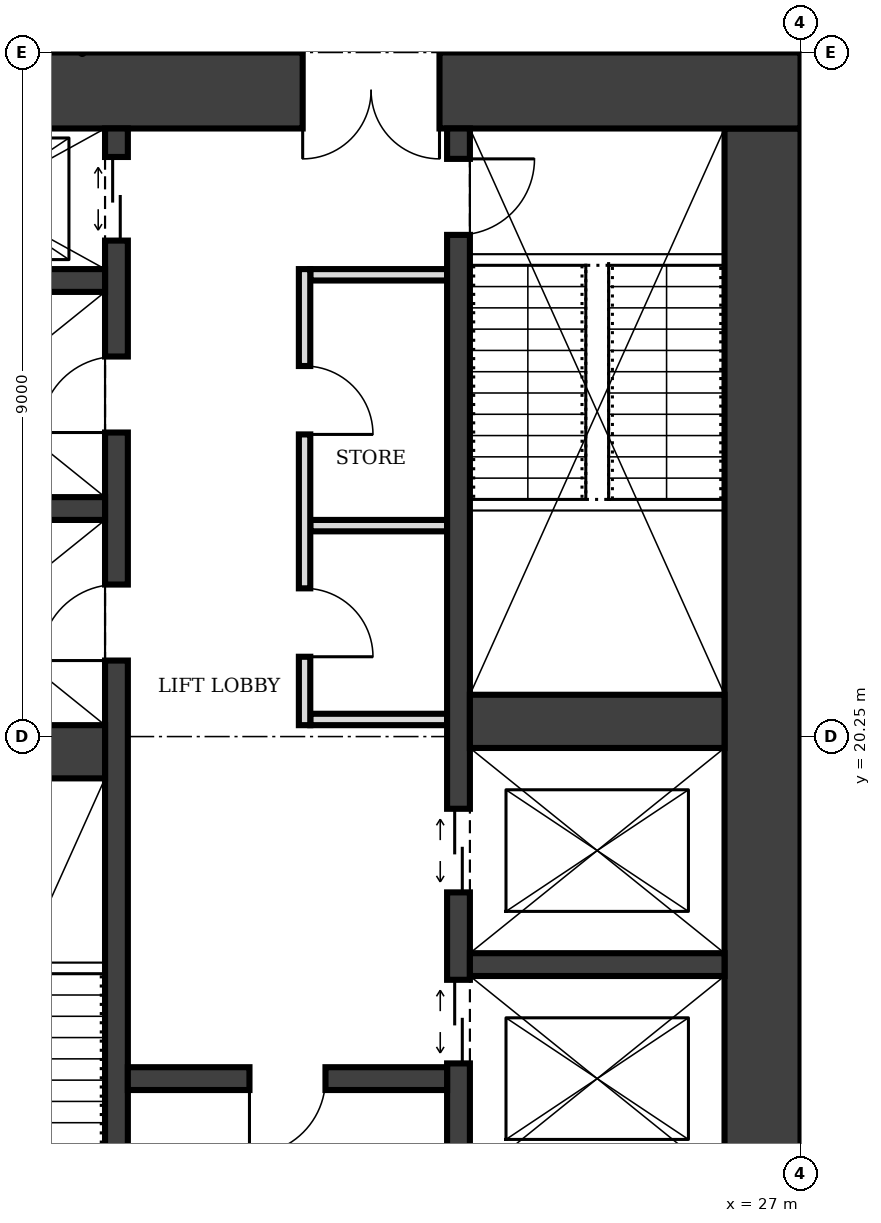
"""IFC4 building model, lengths in metres.
Left out: names, types, materials, properties, quantities, classifications, styles, units other than length and angle.
Written with IfcOpenShell. Run it as: python <this file> out.ifc"""

import sys

from ifc_helpers import new_model, si_unit, direction, frame, frame_2d, origin, place, context, subcontext, project, spatial, rectangle, extrude, element, fill, save


model = new_model("IFC4")
c1 = context("Model", 3, precision=1e-05, world=origin(), true_north=direction((0.0, 1.0)))
c2 = subcontext(c1, "Body", "Model", "MODEL_VIEW")
j1 = project(units=[si_unit("LENGTHUNIT", "METRE"), si_unit("PLANEANGLEUNIT", "RADIAN")], contexts=[c1])
p1 = place(None, origin())
s1 = spatial("IfcSite", under=j1, at=p1, CompositionType="ELEMENT")
p2 = place(p1, origin())
s2 = spatial("IfcBuilding", under=s1, at=p2, CompositionType="ELEMENT")
p3 = place(p2, frame((0.0, 0.0, 269.0)))
s3 = spatial("IfcBuildingStorey", under=s2, at=p3, CompositionType="ELEMENT", Elevation=269.0)
p4 = place(p3, frame((26.5, 12.25, 0.0), z_axis=(0.0, 0.0, 1.0), x_axis=(0.0, 1.0, 0.0)))
e1 = element("IfcWall", 1, at=p4, inside=s3, PredefinedType="SHEAR", context=c2, shape_type="SweptSolid", body=[
    extrude(rectangle(XDim=16.0, YDim=1.0, at=frame_2d((8.0, 0.0))), origin(), (0.0, 0.0, 1.0), 4.0),
])
p5 = place(p3, frame((27.0, 28.75, 0.0), z_axis=(0.0, 0.0, 1.0), x_axis=(-1.0, 0.0, 0.0)))
e2 = element("IfcWall", 2, at=p5, inside=s3, PredefinedType="SHEAR", context=c2, shape_type="SweptSolid", body=[
    extrude(rectangle(XDim=13.5, YDim=1.0, at=frame_2d((6.75, 0.0))), origin(), (0.0, 0.0, 1.0), 4.0),
])
p6 = place(p5, frame((4.75, 0.0, 0.0)))
e3 = element("IfcOpeningElement", 3, at=p6, cuts=e2, PredefinedType="OPENING", context=c2, shape_type="SweptSolid", body=[
    extrude(rectangle(XDim=1.8, YDim=2.1, at=frame_2d((0.9, 1.05))), frame((0.0, 0.51, 0.0), z_axis=(0.0, -1.0, 0.0), x_axis=(1.0, 0.0, 0.0)), (0.0, 0.0, 1.0), 1.02),
])
p7 = place(p3, frame((18.0, 12.25, 0.0), z_axis=(0.0, 0.0, 1.0), x_axis=(0.0, 1.0, 0.0)))
e4 = element("IfcWall", 4, at=p7, inside=s3, PredefinedType="SHEAR", context=c2, shape_type="SweptSolid", body=[
    extrude(rectangle(XDim=16.0, YDim=0.3, at=frame_2d((8.0, 0.0))), origin(), (0.0, 0.0, 1.0), 4.0),
])
p8 = place(p7, frame((0.4, 0.0, 0.0)))
e5 = element("IfcOpeningElement", 5, at=p8, cuts=e4, PredefinedType="OPENING", context=c2, shape_type="SweptSolid", body=[
    extrude(rectangle(XDim=1.0, YDim=2.1, at=frame_2d((0.5, 1.05))), frame((0.0, 0.16, 0.0), z_axis=(0.0, -1.0, 0.0), x_axis=(1.0, 0.0, 0.0)), (0.0, 0.0, 1.0), 0.32),
])
p9 = place(p7, frame((14.525, 0.0, 0.0)))
e6 = element("IfcOpeningElement", 6, at=p9, cuts=e4, PredefinedType="OPENING", context=c2, shape_type="SweptSolid", body=[
    extrude(rectangle(XDim=1.1, YDim=2.1, at=frame_2d((0.55, 1.05))), frame((0.0, 0.16, 0.0), z_axis=(0.0, -1.0, 0.0), x_axis=(1.0, 0.0, 0.0)), (0.0, 0.0, 1.0), 0.32),
])
p10 = place(p7, frame((9.0, 0.0, 0.0)))
e7 = element("IfcOpeningElement", 7, at=p10, cuts=e4, PredefinedType="OPENING", context=c2, shape_type="SweptSolid", body=[
    extrude(rectangle(XDim=1.0, YDim=2.1, at=frame_2d((0.5, 1.05))), frame((0.0, 0.16, 0.0), z_axis=(0.0, -1.0, 0.0), x_axis=(1.0, 0.0, 0.0)), (0.0, 0.0, 1.0), 0.32),
])
p11 = place(p7, frame((12.0, 0.0, 0.0)))
e8 = element("IfcOpeningElement", 8, at=p11, cuts=e4, PredefinedType="OPENING", context=c2, shape_type="SweptSolid", body=[
    extrude(rectangle(XDim=1.0, YDim=2.1, at=frame_2d((0.5, 1.05))), frame((0.0, 0.16, 0.0), z_axis=(0.0, -1.0, 0.0), x_axis=(1.0, 0.0, 0.0)), (0.0, 0.0, 1.0), 0.32),
])
p12 = place(p3, frame((22.5, 12.25, 0.0), z_axis=(0.0, 0.0, 1.0), x_axis=(0.0, 1.0, 0.0)))
e9 = element("IfcWall", 9, at=p12, inside=s3, PredefinedType="SHEAR", context=c2, shape_type="SweptSolid", body=[
    extrude(rectangle(XDim=16.0, YDim=0.3, at=frame_2d((8.0, 0.0))), origin(), (0.0, 0.0, 1.0), 4.0),
])
p13 = place(p12, frame((14.6, 0.0, 0.0)))
e10 = element("IfcOpeningElement", 10, at=p13, cuts=e9, PredefinedType="OPENING", context=c2, shape_type="SweptSolid", body=[
    extrude(rectangle(XDim=1.0, YDim=2.1, at=frame_2d((0.5, 1.05))), frame((0.0, 0.16, 0.0), z_axis=(0.0, -1.0, 0.0), x_axis=(1.0, 0.0, 0.0)), (0.0, 0.0, 1.0), 0.32),
])
p14 = place(p12, frame((0.375, 0.0, 0.0)))
e11 = element("IfcOpeningElement", 11, at=p14, cuts=e9, PredefinedType="OPENING", context=c2, shape_type="SweptSolid", body=[
    extrude(rectangle(XDim=1.1, YDim=2.1, at=frame_2d((0.55, 1.05))), frame((0.0, 0.16, 0.0), z_axis=(0.0, -1.0, 0.0), x_axis=(1.0, 0.0, 0.0)), (0.0, 0.0, 1.0), 0.32),
])
p15 = place(p12, frame((3.7, 0.0, 0.0)))
e12 = element("IfcOpeningElement", 12, at=p15, cuts=e9, PredefinedType="OPENING", context=c2, shape_type="SweptSolid", body=[
    extrude(rectangle(XDim=1.1, YDim=2.1, at=frame_2d((0.55, 1.05))), frame((0.0, 0.16, 0.0), z_axis=(0.0, -1.0, 0.0), x_axis=(1.0, 0.0, 0.0)), (0.0, 0.0, 1.0), 0.32),
])
p16 = place(p12, frame((5.95, 0.0, 0.0)))
e13 = element("IfcOpeningElement", 13, at=p16, cuts=e9, PredefinedType="OPENING", context=c2, shape_type="SweptSolid", body=[
    extrude(rectangle(XDim=1.1, YDim=2.1, at=frame_2d((0.55, 1.05))), frame((0.0, 0.16, 0.0), z_axis=(0.0, -1.0, 0.0), x_axis=(1.0, 0.0, 0.0)), (0.0, 0.0, 1.0), 0.32),
])
p17 = place(p3, frame((14.5, 20.05, 0.0), z_axis=(0.0, 0.0, 1.0), x_axis=(1.0, 0.0, 0.0)))
e14 = element("IfcWall", 14, at=p17, inside=s3, PredefinedType="SHEAR", context=c2, shape_type="SweptSolid", body=[
    extrude(rectangle(XDim=3.35, YDim=0.7, at=frame_2d((1.675, 0.0))), origin(), (0.0, 0.0, 1.0), 4.0),
])
p18 = place(p3, frame((18.15, 15.75, 0.0), z_axis=(0.0, 0.0, 1.0), x_axis=(1.0, 0.0, 0.0)))
e15 = element("IfcWall", 15, at=p18, inside=s3, PredefinedType="SHEAR", context=c2, shape_type="SweptSolid", body=[
    extrude(rectangle(XDim=4.2, YDim=0.3, at=frame_2d((2.1, 0.0))), origin(), (0.0, 0.0, 1.0), 4.0),
])
p19 = place(p18, frame((1.6, 0.0, 0.0)))
e16 = element("IfcOpeningElement", 16, at=p19, cuts=e15, PredefinedType="OPENING", context=c2, shape_type="SweptSolid", body=[
    extrude(rectangle(XDim=1.0, YDim=2.1, at=frame_2d((0.5, 1.05))), frame((0.0, 0.16, 0.0), z_axis=(0.0, -1.0, 0.0), x_axis=(1.0, 0.0, 0.0)), (0.0, 0.0, 1.0), 0.32),
])
p20 = place(p3, frame((22.65, 17.25, 0.0), z_axis=(0.0, 0.0, 1.0), x_axis=(1.0, 0.0, 0.0)))
e17 = element("IfcWall", 17, at=p20, inside=s3, PredefinedType="SHEAR", context=c2, shape_type="SweptSolid", body=[
    extrude(rectangle(XDim=3.35, YDim=0.3, at=frame_2d((1.675, 0.0))), origin(), (0.0, 0.0, 1.0), 4.0),
])
p21 = place(p3, frame((22.65, 20.45, 0.0), z_axis=(0.0, 0.0, 1.0), x_axis=(1.0, 0.0, 0.0)))
e18 = element("IfcWall", 18, at=p21, inside=s3, PredefinedType="SHEAR", context=c2, shape_type="SweptSolid", body=[
    extrude(rectangle(XDim=3.35, YDim=0.7, at=frame_2d((1.675, 0.0))), origin(), (0.0, 0.0, 1.0), 4.0),
])
for number, where, z_axis, x_axis in (
    (19, (14.5, 23.25, 0.0), (0.0, 0.0, 1.0), (1.0, 0.0, 0.0)),
    (20, (14.5, 26.25, 0.0), (0.0, 0.0, 1.0), (1.0, 0.0, 0.0)),
):
    element("IfcWall", number, at=place(p3, frame(where, z_axis=z_axis, x_axis=x_axis)), inside=s3, PredefinedType="SHEAR", context=c2, shape_type="SweptSolid", body=[
        extrude(rectangle(XDim=3.35, YDim=0.3, at=frame_2d((1.675, 0.0))), origin(), (0.0, 0.0, 1.0), 4.0),
    ])
p22 = place(p3, frame((20.475, 20.4, 0.0), z_axis=(0.0, 0.0, 1.0), x_axis=(0.0, 1.0, 0.0)))
e21 = element("IfcWall", 21, at=p22, inside=s3, PredefinedType="PARTITIONING", context=c2, shape_type="SweptSolid", body=[
    extrude(rectangle(XDim=6.0, YDim=0.15, at=frame_2d((3.0, 0.0))), origin(), (0.0, 0.0, 1.0), 3.75),
])
p23 = place(p22, frame((0.9, 0.0, 0.0)))
e22 = element("IfcOpeningElement", 22, at=p23, cuts=e21, PredefinedType="OPENING", context=c2, shape_type="SweptSolid", body=[
    extrude(rectangle(XDim=0.9, YDim=2.1, at=frame_2d((0.45, 1.05))), frame((0.0, 0.085, 0.0), z_axis=(0.0, -1.0, 0.0), x_axis=(1.0, 0.0, 0.0)), (0.0, 0.0, 1.0), 0.17),
])
p24 = place(p22, frame((3.825, 0.0, 0.0)))
e23 = element("IfcOpeningElement", 23, at=p24, cuts=e21, PredefinedType="OPENING", context=c2, shape_type="SweptSolid", body=[
    extrude(rectangle(XDim=0.9, YDim=2.1, at=frame_2d((0.45, 1.05))), frame((0.0, 0.085, 0.0), z_axis=(0.0, -1.0, 0.0), x_axis=(1.0, 0.0, 0.0)), (0.0, 0.0, 1.0), 0.17),
])
for number, where, z_axis, x_axis in (
    (24, (20.55, 20.475, 0.0), (0.0, 0.0, 1.0), (1.0, 0.0, 0.0)),
    (25, (20.55, 23.025, 0.0), (0.0, 0.0, 1.0), (1.0, 0.0, 0.0)),
    (26, (20.55, 26.325, 0.0), (0.0, 0.0, 1.0), (1.0, 0.0, 0.0)),
):
    element("IfcWall", number, at=place(p3, frame(where, z_axis=z_axis, x_axis=x_axis)), inside=s3, PredefinedType="PARTITIONING", context=c2, shape_type="SweptSolid", body=[
        extrude(rectangle(XDim=1.8, YDim=0.15, at=frame_2d((0.9, 0.0))), origin(), (0.0, 0.0, 1.0), 3.75),
    ])
p25 = place(p6, origin())
e27 = element("IfcDoor", 27, at=p25, inside=s3, OperationType="DOUBLE_DOOR_SINGLE_SWING", PredefinedType="DOOR", context=c2, shape_type="SweptSolid", body=[
    extrude(rectangle(XDim=1.8, YDim=2.1, at=frame_2d((0.9, 1.05))), frame((0.0, 0.025, 0.0), z_axis=(0.0, -1.0, 0.0), x_axis=(1.0, 0.0, 0.0)), (0.0, 0.0, 1.0), 0.05),
])
fill(e3, e27)
p26 = place(p19, frame((1.0, 0.0, 0.0), z_axis=(0.0, 0.0, 1.0), x_axis=(-1.0, 0.0, 0.0)))
e28 = element("IfcDoor", 28, at=p26, inside=s3, OperationType="SINGLE_SWING_RIGHT", PredefinedType="DOOR", context=c2, shape_type="SweptSolid", body=[
    extrude(rectangle(XDim=1.0, YDim=2.1, at=frame_2d((0.5, 1.05))), frame((0.0, 0.025, 0.0), z_axis=(0.0, -1.0, 0.0), x_axis=(1.0, 0.0, 0.0)), (0.0, 0.0, 1.0), 0.05),
])
fill(e16, e28)
p27 = place(p13, frame((1.0, 0.0, 0.0), z_axis=(0.0, 0.0, 1.0), x_axis=(-1.0, 0.0, 0.0)))
e29 = element("IfcDoor", 29, at=p27, inside=s3, OperationType="SINGLE_SWING_LEFT", PredefinedType="DOOR", context=c2, shape_type="SweptSolid", body=[
    extrude(rectangle(XDim=1.0, YDim=2.1, at=frame_2d((0.5, 1.05))), frame((0.0, 0.025, 0.0), z_axis=(0.0, -1.0, 0.0), x_axis=(1.0, 0.0, 0.0)), (0.0, 0.0, 1.0), 0.05),
])
fill(e10, e29)
p28 = place(p9, origin())
e30 = element("IfcDoor", 30, at=p28, inside=s3, OperationType="DOUBLE_DOOR_SLIDING", PredefinedType="DOOR", context=c2, shape_type="SweptSolid", body=[
    extrude(rectangle(XDim=1.1, YDim=2.1, at=frame_2d((0.55, 1.05))), frame((0.0, 0.025, 0.0), z_axis=(0.0, -1.0, 0.0), x_axis=(1.0, 0.0, 0.0)), (0.0, 0.0, 1.0), 0.05),
])
fill(e6, e30)
p29 = place(p15, origin())
e31 = element("IfcDoor", 31, at=p29, inside=s3, OperationType="DOUBLE_DOOR_SLIDING", PredefinedType="DOOR", context=c2, shape_type="SweptSolid", body=[
    extrude(rectangle(XDim=1.1, YDim=2.1, at=frame_2d((0.55, 1.05))), frame((0.0, 0.025, 0.0), z_axis=(0.0, -1.0, 0.0), x_axis=(1.0, 0.0, 0.0)), (0.0, 0.0, 1.0), 0.05),
])
fill(e12, e31)
p30 = place(p16, origin())
e32 = element("IfcDoor", 32, at=p30, inside=s3, OperationType="DOUBLE_DOOR_SLIDING", PredefinedType="DOOR", context=c2, shape_type="SweptSolid", body=[
    extrude(rectangle(XDim=1.1, YDim=2.1, at=frame_2d((0.55, 1.05))), frame((0.0, 0.025, 0.0), z_axis=(0.0, -1.0, 0.0), x_axis=(1.0, 0.0, 0.0)), (0.0, 0.0, 1.0), 0.05),
])
fill(e13, e32)
p31 = place(p23, frame((0.9, 0.0, 0.0), z_axis=(0.0, 0.0, 1.0), x_axis=(-1.0, 0.0, 0.0)))
e33 = element("IfcDoor", 33, at=p31, inside=s3, OperationType="SINGLE_SWING_RIGHT", PredefinedType="DOOR", context=c2, shape_type="SweptSolid", body=[
    extrude(rectangle(XDim=0.9, YDim=2.1, at=frame_2d((0.45, 1.05))), frame((0.0, 0.025, 0.0), z_axis=(0.0, -1.0, 0.0), x_axis=(1.0, 0.0, 0.0)), (0.0, 0.0, 1.0), 0.05),
])
fill(e22, e33)
p32 = place(p24, frame((0.9, 0.0, 0.0), z_axis=(0.0, 0.0, 1.0), x_axis=(-1.0, 0.0, 0.0)))
e34 = element("IfcDoor", 34, at=p32, inside=s3, OperationType="SINGLE_SWING_RIGHT", PredefinedType="DOOR", context=c2, shape_type="SweptSolid", body=[
    extrude(rectangle(XDim=0.9, YDim=2.1, at=frame_2d((0.45, 1.05))), frame((0.0, 0.025, 0.0), z_axis=(0.0, -1.0, 0.0), x_axis=(1.0, 0.0, 0.0)), (0.0, 0.0, 1.0), 0.05),
])
fill(e23, e34)
p33 = place(p10, origin())
e35 = element("IfcDoor", 35, at=p33, inside=s3, OperationType="SINGLE_SWING_LEFT", PredefinedType="DOOR", context=c2, shape_type="SweptSolid", body=[
    extrude(rectangle(XDim=1.0, YDim=2.1, at=frame_2d((0.5, 1.05))), frame((0.0, 0.025, 0.0), z_axis=(0.0, -1.0, 0.0), x_axis=(1.0, 0.0, 0.0)), (0.0, 0.0, 1.0), 0.05),
])
fill(e7, e35)
p34 = place(p11, origin())
e36 = element("IfcDoor", 36, at=p34, inside=s3, OperationType="SINGLE_SWING_LEFT", PredefinedType="DOOR", context=c2, shape_type="SweptSolid", body=[
    extrude(rectangle(XDim=1.0, YDim=2.1, at=frame_2d((0.5, 1.05))), frame((0.0, 0.025, 0.0), z_axis=(0.0, -1.0, 0.0), x_axis=(1.0, 0.0, 0.0)), (0.0, 0.0, 1.0), 0.05),
])
fill(e8, e36)
save(model, sys.argv[1])
